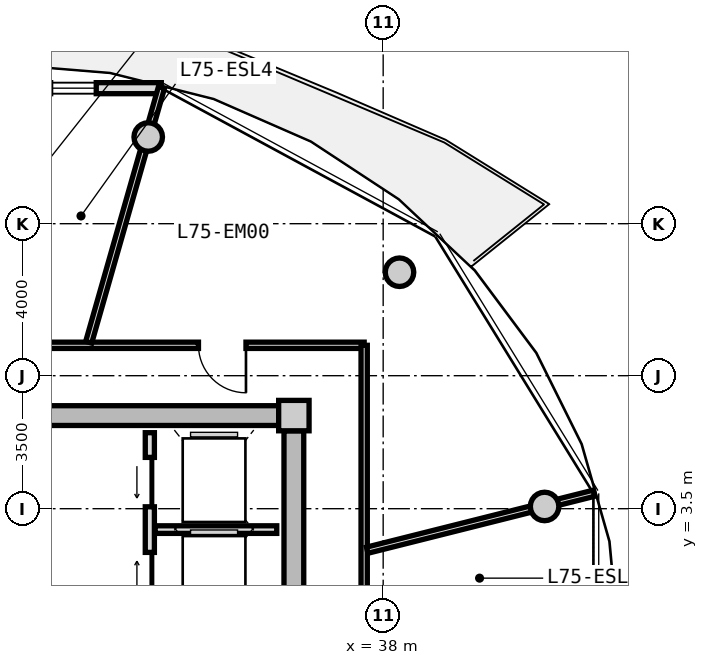
"""IFC4 building model, lengths in metres.
Left out: names, types, materials, properties, quantities, classifications, styles, units other than length and angle.
Written with IfcOpenShell. Run it as: python <this file> out.ifc"""

import sys

from ifc_helpers import new_model, si_unit, direction, frame, frame_2d, origin, origin_2d, place, context, subcontext, project, spatial, rectangle, circle, extrude, source, transform, mapped, element, fill, save


model = new_model("IFC4")
c1 = context("Model", 3, precision=1e-05, world=origin(), true_north=direction((0.0, 1.0)))
c2 = subcontext(c1, "Body", "Model", "MODEL_VIEW")
j1 = project(units=[si_unit("LENGTHUNIT", "METRE"), si_unit("PLANEANGLEUNIT", "RADIAN")], contexts=[c1])
p1 = place(None, origin())
s1 = spatial("IfcSite", under=j1, at=p1, CompositionType="ELEMENT")
p2 = place(p1, origin())
s2 = spatial("IfcBuilding", under=s1, at=p2, CompositionType="ELEMENT")
p3 = place(p2, frame((0.0, 0.0, 241.35)))
s3 = spatial("IfcBuildingStorey", under=s2, at=p3, CompositionType="ELEMENT", Elevation=241.35)
m1 = source(origin(), c2, "Body", "SweptSolid", [
    extrude(rectangle(XDim=0.8, YDim=0.8, at=origin_2d()), origin(), (0.0, 0.0, 1.0), 3.05),
])
p4 = place(p3, frame((35.65, 5.95, 0.0), z_axis=(0.0, 0.0, 1.0), x_axis=(1.0, 0.0, 0.0)))
e1 = element("IfcColumn", 1, at=p4, inside=s3, PredefinedType="COLUMN", context=c2, shape_type="MappedRepresentation", body=[
    mapped(m1, transform((0.0, 0.0, 0.0), x_axis=(1.0, 0.0, 0.0), y_axis=(0.0, 1.0, 0.0), z_axis=(0.0, 0.0, 1.0), scale=1.0)),
])
m2 = source(origin(), c2, "Body", "SweptSolid", [
    extrude(rectangle(XDim=14.5, YDim=0.52, at=frame_2d((7.25, 0.0))), origin(), (0.0, 0.0, 1.0), 2.73),
])
p5 = place(p3, frame((20.75, 5.95, 0.0), z_axis=(0.0, 0.0, 1.0), x_axis=(1.0, 0.0, 0.0)))
e2 = element("IfcWall", 2, at=p5, inside=s3, PredefinedType="SHEAR", context=c2, shape_type="MappedRepresentation", body=[
    mapped(m2, transform((0.0, 0.0, 0.0), x_axis=(1.0, 0.0, 0.0), y_axis=(0.0, 1.0, 0.0), z_axis=(0.0, 0.0, 1.0), scale=1.0)),
])
m3 = source(origin(), c2, "Body", "SweptSolid", [
    extrude(rectangle(XDim=11.1, YDim=0.52, at=frame_2d((5.55, 0.0))), origin(), (0.0, 0.0, 1.0), 2.73),
])
p6 = place(p3, frame((35.65, 5.55, 0.0), z_axis=(0.0, 0.0, 1.0), x_axis=(0.0, -1.0, 0.0)))
e3 = element("IfcWall", 3, at=p6, inside=s3, PredefinedType="SHEAR", context=c2, shape_type="MappedRepresentation", body=[
    mapped(m3, transform((0.0, 0.0, 0.0), x_axis=(1.0, 0.0, 0.0), y_axis=(0.0, 1.0, 0.0), z_axis=(0.0, 0.0, 1.0), scale=1.0)),
])
p7 = place(p6, frame((5.65, 0.0, 0.0)))
e4 = element("IfcOpeningElement", 4, at=p7, cuts=e3, PredefinedType="OPENING", context=c2, shape_type="SweptSolid", body=[
    extrude(rectangle(XDim=1.2, YDim=2.15, at=frame_2d((0.6, 1.075))), frame((0.0, 0.27, 0.0), z_axis=(0.0, -1.0, 0.0), x_axis=(1.0, 0.0, 0.0)), (0.0, 0.0, 1.0), 0.54),
])
m4 = source(origin(), c2, "Body", "SweptSolid", [
    extrude(circle(Radius=0.375, at=origin_2d()), origin(), (0.0, 0.0, 1.0), 3.05),
])
for number, where, z_axis, x_axis in (
    (5, (42.247, 3.559, 0.0), (0.0, 0.0, 1.0), (1.0, 0.0, 0.0)),
    (6, (38.43, 9.723, 0.0), (0.0, 0.0, 1.0), (1.0, 0.0, 0.0)),
    (7, (31.818, 13.281, 0.0), (0.0, 0.0, 1.0), (1.0, 0.0, 0.0)),
):
    element("IfcColumn", number, at=place(p3, frame(where, z_axis=z_axis, x_axis=x_axis)), inside=s3, PredefinedType="COLUMN", context=c2, shape_type="MappedRepresentation", body=[
        mapped(m4, transform((0.0, 0.0, 0.0), x_axis=(1.0, 0.0, 0.0), y_axis=(0.0, 1.0, 0.0), z_axis=(0.0, 0.0, 1.0), scale=1.0)),
    ])
m5 = source(origin(), c2, "Body", "SweptSolid", [
    extrude(rectangle(XDim=8.324, YDim=0.29, at=frame_2d((4.162, 0.0))), origin(), (0.0, 0.0, 1.0), 2.73),
])
p8 = place(p3, frame((23.838, 14.566, 0.0), z_axis=(0.0, 0.0, 1.0), x_axis=(1.0, 0.0, 0.0)))
e8 = element("IfcWall", 8, at=p8, inside=s3, PredefinedType="SOLIDWALL", context=c2, shape_type="MappedRepresentation", body=[
    mapped(m5, transform((0.0, 0.0, 0.0), x_axis=(1.0, 0.0, 0.0), y_axis=(0.0, 1.0, 0.0), z_axis=(0.0, 0.0, 1.0), scale=1.0)),
])
p9 = place(p8, frame((0.9, 0.0, 0.0)))
e9 = element("IfcOpeningElement", 9, at=p9, cuts=e8, PredefinedType="OPENING", context=c2, shape_type="SweptSolid", body=[
    extrude(rectangle(XDim=1.15, YDim=2.25, at=frame_2d((0.575, 1.125))), frame((0.0, 0.155, 0.0), z_axis=(0.0, -1.0, 0.0), x_axis=(1.0, 0.0, 0.0)), (0.0, 0.0, 1.0), 0.31),
])
p10 = place(p8, frame((5.412, 0.0, 0.85)))
e10 = element("IfcOpeningElement", 10, at=p10, cuts=e8, PredefinedType="OPENING", context=c2, shape_type="SweptSolid", body=[
    extrude(rectangle(XDim=1.2, YDim=1.5, at=frame_2d((0.6, 0.75))), frame((0.0, 0.155, 0.0), z_axis=(0.0, -1.0, 0.0), x_axis=(1.0, 0.0, 0.0)), (0.0, 0.0, 1.0), 0.31),
])
m6 = source(origin(), c2, "Body", "SweptSolid", [
    extrude(rectangle(XDim=5.0, YDim=0.24, at=frame_2d((2.5, 0.0))), origin(), (0.0, 0.0, 1.0), 2.715),
])
p11 = place(p3, frame((31.86, 0.5, 0.0), z_axis=(0.0, 0.0, 1.0), x_axis=(0.0, 1.0, 0.0)))
e11 = element("IfcWall", 11, at=p11, inside=s3, PredefinedType="PARTITIONING", context=c2, shape_type="MappedRepresentation", body=[
    mapped(m6, transform((0.0, 0.0, 0.0), x_axis=(1.0, 0.0, 0.0), y_axis=(0.0, 1.0, 0.0), z_axis=(0.0, 0.0, 1.0), scale=1.0)),
])
p12 = place(p11, frame((3.05, 0.0, 0.0)))
e12 = element("IfcOpeningElement", 12, at=p12, cuts=e11, PredefinedType="OPENING", context=c2, shape_type="SweptSolid", body=[
    extrude(rectangle(XDim=1.3, YDim=2.2, at=frame_2d((0.65, 1.1))), frame((0.0, 0.13, 0.0), z_axis=(0.0, -1.0, 0.0), x_axis=(1.0, 0.0, 0.0)), (0.0, 0.0, 1.0), 0.26),
])
p13 = place(p11, frame((0.55, 0.0, 0.0)))
e13 = element("IfcOpeningElement", 13, at=p13, cuts=e11, PredefinedType="OPENING", context=c2, shape_type="SweptSolid", body=[
    extrude(rectangle(XDim=1.3, YDim=2.2, at=frame_2d((0.65, 1.1))), frame((0.0, 0.13, 0.0), z_axis=(0.0, -1.0, 0.0), x_axis=(1.0, 0.0, 0.0)), (0.0, 0.0, 1.0), 0.26),
])
m7 = source(origin(), c2, "Body", "SweptSolid", [
    extrude(rectangle(XDim=3.2, YDim=0.2, at=frame_2d((1.6, 0.0))), origin(), (0.0, 0.0, 1.0), 2.715),
])
p14 = place(p3, frame((32.0, 2.95, 0.0), z_axis=(0.0, 0.0, 1.0), x_axis=(1.0, 0.0, 0.0)))
e14 = element("IfcWall", 14, at=p14, inside=s3, PredefinedType="PARTITIONING", context=c2, shape_type="MappedRepresentation", body=[
    mapped(m7, transform((0.0, 0.0, 0.0), x_axis=(1.0, 0.0, 0.0), y_axis=(0.0, 1.0, 0.0), z_axis=(0.0, 0.0, 1.0), scale=1.0)),
])
m8 = source(origin(), c2, "Body", "SweptSolid", [
    extrude(rectangle(XDim=8.58, YDim=0.165, at=frame_2d((4.29, 0.0))), origin(), (0.0, 0.0, 1.0), 2.715),
])
p15 = place(p3, frame((28.92, 7.8, 0.0), z_axis=(0.0, 0.0, 1.0), x_axis=(1.0, 0.0, 0.0)))
e15 = element("IfcWall", 15, at=p15, inside=s3, PredefinedType="PARTITIONING", context=c2, shape_type="MappedRepresentation", body=[
    mapped(m8, transform((0.0, 0.0, 0.0), x_axis=(1.0, 0.0, 0.0), y_axis=(0.0, 1.0, 0.0), z_axis=(0.0, 0.0, 1.0), scale=1.0)),
])
p16 = place(p15, frame((4.22, 0.0, 0.0)))
e16 = element("IfcOpeningElement", 16, at=p16, cuts=e15, PredefinedType="OPENING", context=c2, shape_type="SweptSolid", body=[
    extrude(rectangle(XDim=1.25, YDim=2.2, at=frame_2d((0.625, 1.1))), frame((0.0, 0.093, 0.0), z_axis=(0.0, -1.0, 0.0), x_axis=(1.0, 0.0, 0.0)), (0.0, 0.0, 1.0), 0.185),
])
m9 = source(origin(), c2, "Body", "SweptSolid", [
    extrude(rectangle(XDim=6.88, YDim=0.165, at=frame_2d((3.44, 0.0))), origin(), (0.0, 0.0, 1.0), 2.715),
])
p17 = place(p3, frame((37.5, 7.8, 0.0), z_axis=(0.0, 0.0, 1.0), x_axis=(0.0, -1.0, 0.0)))
e17 = element("IfcWall", 17, at=p17, inside=s3, PredefinedType="PARTITIONING", context=c2, shape_type="MappedRepresentation", body=[
    mapped(m9, transform((0.0, 0.0, 0.0), x_axis=(1.0, 0.0, 0.0), y_axis=(0.0, 1.0, 0.0), z_axis=(0.0, 0.0, 1.0), scale=1.0)),
])
m10 = source(origin(), c2, "Body", "SweptSolid", [
    extrude(rectangle(XDim=6.974, YDim=0.165, at=frame_2d((3.487, 0.0))), origin(), (0.0, 0.0, 1.0), 2.315),
])
p18 = place(p3, frame((30.251, 7.88, 0.0), z_axis=(0.0, 0.0, 1.0), x_axis=(0.274707256801, 0.961527910703, 0.0)))
e18 = element("IfcWall", 18, at=p18, inside=s3, PredefinedType="PARTITIONING", context=c2, shape_type="MappedRepresentation", body=[
    mapped(m10, transform((0.0, 0.0, 0.0), x_axis=(1.0, 0.0, 0.0), y_axis=(0.0, 1.0, 0.0), z_axis=(0.0, 0.0, 1.0), scale=1.0)),
])
m11 = source(origin(), c2, "Body", "SweptSolid", [
    extrude(rectangle(XDim=6.157, YDim=0.165, at=frame_2d((3.079, 0.0))), origin(), (0.0, 0.0, 1.0), 2.315),
])
p19 = place(p3, frame((37.58, 2.407, 0.0), z_axis=(0.0, 0.0, 1.0), x_axis=(0.969840867184, 0.243738984038, 0.0)))
e19 = element("IfcWall", 19, at=p19, inside=s3, PredefinedType="PARTITIONING", context=c2, shape_type="MappedRepresentation", body=[
    mapped(m11, transform((0.0, 0.0, 0.0), x_axis=(1.0, 0.0, 0.0), y_axis=(0.0, 1.0, 0.0), z_axis=(0.0, 0.0, 1.0), scale=1.0)),
])
m12 = source(origin(), c2, "Body", "SweptSolid", [
    extrude(rectangle(XDim=1.2, YDim=1.5, at=frame_2d((0.6, 0.75))), frame((0.0, 0.03, 0.0), z_axis=(0.0, -1.0, 0.0), x_axis=(1.0, 0.0, 0.0)), (0.0, 0.0, 1.0), 0.06),
])
p20 = place(p10, origin())
e20 = element("IfcWindow", 20, at=p20, inside=s3, PartitioningType="SINGLE_PANEL", PredefinedType="WINDOW", context=c2, shape_type="MappedRepresentation", body=[
    mapped(m12, transform((0.0, 0.0, 0.0), x_axis=(1.0, 0.0, 0.0), y_axis=(0.0, 1.0, 0.0), z_axis=(0.0, 0.0, 1.0), scale=1.0)),
])
fill(e10, e20)
m13 = source(origin(), c2, "Body", "SweptSolid", [
    extrude(rectangle(XDim=1.3, YDim=2.2, at=frame_2d((0.65, 1.1))), frame((0.0, 0.025, 0.0), z_axis=(0.0, -1.0, 0.0), x_axis=(1.0, 0.0, 0.0)), (0.0, 0.0, 1.0), 0.05),
])
p21 = place(p12, origin())
e21 = element("IfcDoor", 21, at=p21, inside=s3, OperationType="SLIDING_TO_LEFT", PredefinedType="DOOR", context=c2, shape_type="MappedRepresentation", body=[
    mapped(m13, transform((0.0, 0.0, 0.0), x_axis=(1.0, 0.0, 0.0), y_axis=(0.0, 1.0, 0.0), z_axis=(0.0, 0.0, 1.0), scale=1.0)),
])
fill(e12, e21)
p22 = place(p13, origin())
e22 = element("IfcDoor", 22, at=p22, inside=s3, OperationType="SLIDING_TO_RIGHT", PredefinedType="DOOR", context=c2, shape_type="MappedRepresentation", body=[
    mapped(m13, transform((0.0, 0.0, 0.0), x_axis=(1.0, 0.0, 0.0), y_axis=(0.0, 1.0, 0.0), z_axis=(0.0, 0.0, 1.0), scale=1.0)),
])
fill(e13, e22)
m14 = source(origin(), c2, "Body", "SweptSolid", [
    extrude(rectangle(XDim=1.25, YDim=2.2, at=frame_2d((0.625, 1.1))), frame((0.0, 0.025, 0.0), z_axis=(0.0, -1.0, 0.0), x_axis=(1.0, 0.0, 0.0)), (0.0, 0.0, 1.0), 0.05),
])
p23 = place(p16, frame((1.25, 0.0, 0.0), z_axis=(0.0, 0.0, 1.0), x_axis=(-1.0, 0.0, 0.0)))
e23 = element("IfcDoor", 23, at=p23, inside=s3, OperationType="SINGLE_SWING_LEFT", PredefinedType="DOOR", context=c2, shape_type="MappedRepresentation", body=[
    mapped(m14, transform((0.0, 0.0, 0.0), x_axis=(1.0, 0.0, 0.0), y_axis=(0.0, 1.0, 0.0), z_axis=(0.0, 0.0, 1.0), scale=1.0)),
])
fill(e16, e23)
save(model, sys.argv[1])
